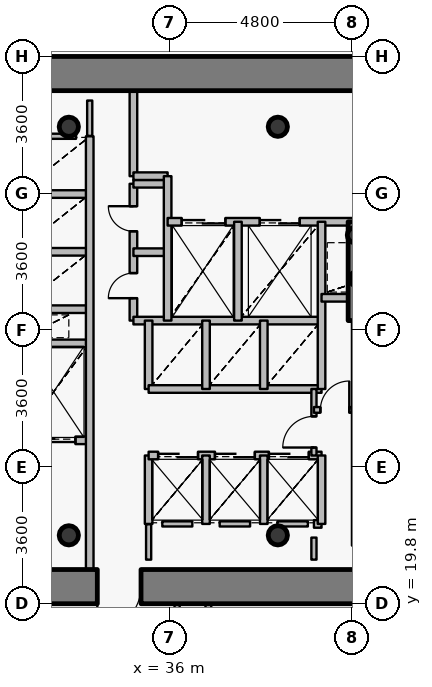
"""IFC4 building model, lengths in metres.
Left out: names, types, materials, properties, quantities, classifications, styles, units other than length and angle.
Written with IfcOpenShell. Run it as: python <this file> out.ifc"""

import sys

from ifc_helpers import new_model, si_unit, direction, frame, frame_2d, origin, origin_2d, place, context, subcontext, project, spatial, rectangle, hollow_circle, extrude, source, transform, mapped, element, fill, save


model = new_model("IFC4")
c1 = context("Model", 3, precision=1e-05, world=origin(), true_north=direction((0.0, 1.0)))
c2 = subcontext(c1, "Body", "Model", "MODEL_VIEW")
j1 = project(units=[si_unit("LENGTHUNIT", "METRE"), si_unit("PLANEANGLEUNIT", "RADIAN")], contexts=[c1])
p1 = place(None, origin())
s1 = spatial("IfcSite", under=j1, at=p1, CompositionType="ELEMENT")
p2 = place(p1, origin())
s2 = spatial("IfcBuilding", under=s1, at=p2, CompositionType="ELEMENT")
p3 = place(p2, frame((0.0, 0.0, 45.0)))
s3 = spatial("IfcBuildingStorey", under=s2, at=p3, CompositionType="ELEMENT", Elevation=45.0)
for number, where, z_axis, x_axis in (
    (1, (33.35, 21.6, 0.0), (0.0, 0.0, 1.0), (1.0, 0.0, 0.0)),
    (2, (38.85, 21.6, 0.0), (0.0, 0.0, 1.0), (1.0, 0.0, 0.0)),
    (3, (38.85, 32.35, 0.0), (0.0, 0.0, 1.0), (1.0, 0.0, 0.0)),
    (4, (33.35, 32.35, 0.0), (0.0, 0.0, 1.0), (1.0, 0.0, 0.0)),
):
    element("IfcColumn", number, at=place(p3, frame(where, z_axis=z_axis, x_axis=x_axis)), inside=s3, PredefinedType="COLUMN", context=c2, shape_type="SweptSolid", body=[
        extrude(hollow_circle(Radius=0.254, WallThickness=0.02, at=origin_2d()), origin(), (0.0, 0.0, 1.0), 4.2),
    ])
for number, where, z_axis, x_axis in (
    (5, (40.95, 28.35, 0.0), (0.0, 0.0, 1.0), (1.0, 0.0, 0.0)),
    (6, (40.88, 29.5, 0.0), (0.0, 0.0, 1.0), (1.0, 0.0, 0.0)),
):
    element("IfcColumn", number, at=place(p3, frame(where, z_axis=z_axis, x_axis=x_axis)), inside=s3, PredefinedType="COLUMN", context=c2, shape_type="SweptSolid", body=[
        extrude(hollow_circle(Radius=0.203, WallThickness=0.016, at=origin_2d()), origin(), (0.0, 0.0, 1.0), 4.2),
    ])
p4 = place(p3, frame((26.75, 33.75, 0.0), z_axis=(0.0, 0.0, 1.0), x_axis=(1.0, 0.0, 0.0)))
e7 = element("IfcWall", 7, at=p4, inside=s3, PredefinedType="SHEAR", context=c2, shape_type="SweptSolid", body=[
    extrude(rectangle(XDim=18.5, YDim=0.9, at=frame_2d((9.25, 0.0))), origin(), (0.0, 0.0, 1.0), 3.4),
])
p5 = place(p3, frame((45.25, 20.25, 0.0), z_axis=(0.0, 0.0, 1.0), x_axis=(-1.0, 0.0, 0.0)))
e8 = element("IfcWall", 8, at=p5, inside=s3, PredefinedType="SHEAR", context=c2, shape_type="SweptSolid", body=[
    extrude(rectangle(XDim=18.5, YDim=0.9, at=frame_2d((9.25, 0.0))), origin(), (0.0, 0.0, 1.0), 3.4),
])
p6 = place(p5, frame((10.0, 0.0, 0.0)))
e9 = element("IfcOpeningElement", 9, at=p6, cuts=e8, PredefinedType="OPENING", context=c2, shape_type="SweptSolid", body=[
    extrude(rectangle(XDim=1.15, YDim=2.15, at=origin_2d()), frame((0.575, 0.46, 1.075), z_axis=(0.0, -1.0, 0.0), x_axis=(1.0, 0.0, 0.0)), (0.0, 0.0, 1.0), 0.92),
])
p7 = place(p3, frame((40.9, 27.25, 0.0), z_axis=(0.0, 0.0, 1.0), x_axis=(0.0, 1.0, 0.0)))
e10 = element("IfcWall", 10, at=p7, inside=s3, PredefinedType="SHEAR", context=c2, shape_type="SweptSolid", body=[
    extrude(rectangle(XDim=2.6, YDim=0.4, at=frame_2d((1.3, 0.0))), origin(), (0.0, 0.0, 1.0), 3.55),
])
p8 = place(p3, frame((32.0, 24.1, 0.0), z_axis=(0.0, 0.0, 1.0), x_axis=(1.0, 0.0, 0.0)))
e11 = element("IfcWall", 11, at=p8, inside=s3, PredefinedType="PARTITIONING", context=c2, shape_type="SweptSolid", body=[
    extrude(rectangle(XDim=1.9, YDim=0.2, at=frame_2d((0.95, 0.0))), origin(), (0.0, 0.0, 1.0), 3.535),
])
p9 = place(p8, frame((0.375, 0.0, 0.0)))
e12 = element("IfcOpeningElement", 12, at=p9, cuts=e11, PredefinedType="OPENING", context=c2, shape_type="SweptSolid", body=[
    extrude(rectangle(XDim=1.15, YDim=2.15, at=origin_2d()), frame((0.575, 0.11, 1.075), z_axis=(0.0, -1.0, 0.0), x_axis=(1.0, 0.0, 0.0)), (0.0, 0.0, 1.0), 0.22),
])
for number, where, z_axis, x_axis in (
    (13, (32.0, 26.65, 0.0), (0.0, 0.0, 1.0), (1.0, 0.0, 0.0)),
    (14, (32.0, 27.55, 0.0), (0.0, 0.0, 1.0), (1.0, 0.0, 0.0)),
    (15, (32.0, 29.06, 0.0), (0.0, 0.0, 1.0), (1.0, 0.0, 0.0)),
    (16, (32.0, 30.58, 0.0), (0.0, 0.0, 1.0), (1.0, 0.0, 0.0)),
):
    element("IfcWall", number, at=place(p3, frame(where, z_axis=z_axis, x_axis=x_axis)), inside=s3, PredefinedType="PARTITIONING", context=c2, shape_type="SweptSolid", body=[
        extrude(rectangle(XDim=1.9, YDim=0.2, at=frame_2d((0.95, 0.0))), origin(), (0.0, 0.0, 1.0), 3.535),
    ])
p10 = place(p3, frame((33.9, 20.7, 0.0), z_axis=(0.0, 0.0, 1.0), x_axis=(0.0, 1.0, 0.0)))
e17 = element("IfcWall", 17, at=p10, inside=s3, PredefinedType="PARTITIONING", context=c2, shape_type="SweptSolid", body=[
    extrude(rectangle(XDim=11.4, YDim=0.2, at=frame_2d((5.7, 0.0))), origin(), (0.0, 0.0, 1.0), 3.535),
])
p11 = place(p3, frame((35.05, 27.25, 0.0), z_axis=(0.0, 0.0, 1.0), x_axis=(0.0, 1.0, 0.0)))
e18 = element("IfcWall", 18, at=p11, inside=s3, PredefinedType="PARTITIONING", context=c2, shape_type="SweptSolid", body=[
    extrude(rectangle(XDim=3.6, YDim=0.2, at=frame_2d((1.8, 0.0))), origin(), (0.0, 0.0, 1.0), 3.95),
])
p12 = place(p11, frame((0.59, 0.0, 0.0)))
e19 = element("IfcOpeningElement", 19, at=p12, cuts=e18, PredefinedType="OPENING", context=c2, shape_type="SweptSolid", body=[
    extrude(rectangle(XDim=0.66, YDim=2.05, at=origin_2d()), frame((0.33, 0.11, 1.025), z_axis=(0.0, -1.0, 0.0), x_axis=(1.0, 0.0, 0.0)), (0.0, 0.0, 1.0), 0.22),
])
p13 = place(p11, frame((2.35, 0.0, 0.0)))
e20 = element("IfcOpeningElement", 20, at=p13, cuts=e18, PredefinedType="OPENING", context=c2, shape_type="SweptSolid", body=[
    extrude(rectangle(XDim=0.66, YDim=2.05, at=origin_2d()), frame((0.33, 0.11, 1.025), z_axis=(0.0, -1.0, 0.0), x_axis=(1.0, 0.0, 0.0)), (0.0, 0.0, 1.0), 0.22),
])
p14 = place(p3, frame((35.05, 27.25, 0.0), z_axis=(0.0, 0.0, 1.0), x_axis=(1.0, 0.0, 0.0)))
e21 = element("IfcWall", 21, at=p14, inside=s3, PredefinedType="PARTITIONING", context=c2, shape_type="SweptSolid", body=[
    extrude(rectangle(XDim=4.95, YDim=0.2, at=frame_2d((2.475, 0.0))), origin(), (0.0, 0.0, 1.0), 3.535),
])
for number, where, z_axis, x_axis in (
    (22, (35.05, 29.05, 0.0), (0.0, 0.0, 1.0), (1.0, 0.0, 0.0)),
    (23, (35.05, 30.85, 0.0), (0.0, 0.0, 1.0), (1.0, 0.0, 0.0)),
):
    element("IfcWall", number, at=place(p3, frame(where, z_axis=z_axis, x_axis=x_axis)), inside=s3, PredefinedType="PARTITIONING", context=c2, shape_type="SweptSolid", body=[
        extrude(rectangle(XDim=0.9, YDim=0.2, at=frame_2d((0.45, 0.0))), origin(), (0.0, 0.0, 1.0), 3.95),
    ])
p15 = place(p3, frame((35.05, 31.05, 0.0), z_axis=(0.0, 0.0, 1.0), x_axis=(0.0, 1.0, 0.0)))
e24 = element("IfcWall", 24, at=p15, inside=s3, PredefinedType="PARTITIONING", context=c2, shape_type="SweptSolid", body=[
    extrude(rectangle(XDim=2.25, YDim=0.2, at=frame_2d((1.125, 0.0))), origin(), (0.0, 0.0, 1.0), 3.535),
])
p16 = place(p3, frame((35.05, 31.05, 0.0), z_axis=(0.0, 0.0, 1.0), x_axis=(1.0, 0.0, 0.0)))
e25 = element("IfcWall", 25, at=p16, inside=s3, PredefinedType="PARTITIONING", context=c2, shape_type="SweptSolid", body=[
    extrude(rectangle(XDim=0.9, YDim=0.2, at=frame_2d((0.45, 0.0))), origin(), (0.0, 0.0, 1.0), 3.95),
])
p17 = place(p3, frame((35.45, 21.9, 0.0), z_axis=(0.0, 0.0, 1.0), x_axis=(0.0, 1.0, 0.0)))
e26 = element("IfcWall", 26, at=p17, inside=s3, PredefinedType="PARTITIONING", context=c2, shape_type="SweptSolid", body=[
    extrude(rectangle(XDim=1.8, YDim=0.2, at=frame_2d((0.9, 0.0))), origin(), (0.0, 0.0, 1.0), 3.95),
])
p18 = place(p3, frame((35.45, 23.7, 0.0), z_axis=(0.0, 0.0, 1.0), x_axis=(1.0, 0.0, 0.0)))
e27 = element("IfcWall", 27, at=p18, inside=s3, PredefinedType="PARTITIONING", context=c2, shape_type="SweptSolid", body=[
    extrude(rectangle(XDim=4.55, YDim=0.2, at=frame_2d((2.275, 0.0))), origin(), (0.0, 0.0, 1.0), 3.535),
])
p19 = place(p18, frame((0.25, 0.0, 0.0)))
e28 = element("IfcOpeningElement", 28, at=p19, cuts=e27, PredefinedType="OPENING", context=c2, shape_type="SweptSolid", body=[
    extrude(rectangle(XDim=1.05, YDim=2.15, at=origin_2d()), frame((0.525, 0.11, 1.075), z_axis=(0.0, -1.0, 0.0), x_axis=(1.0, 0.0, 0.0)), (0.0, 0.0, 1.0), 0.22),
])
p20 = place(p18, frame((1.745, 0.0, 0.0)))
e29 = element("IfcOpeningElement", 29, at=p20, cuts=e27, PredefinedType="OPENING", context=c2, shape_type="SweptSolid", body=[
    extrude(rectangle(XDim=1.05, YDim=2.15, at=origin_2d()), frame((0.525, 0.11, 1.075), z_axis=(0.0, -1.0, 0.0), x_axis=(1.0, 0.0, 0.0)), (0.0, 0.0, 1.0), 0.22),
])
p21 = place(p18, frame((3.165, 0.0, 0.0)))
e30 = element("IfcOpeningElement", 30, at=p21, cuts=e27, PredefinedType="OPENING", context=c2, shape_type="SweptSolid", body=[
    extrude(rectangle(XDim=1.05, YDim=2.15, at=origin_2d()), frame((0.525, 0.11, 1.075), z_axis=(0.0, -1.0, 0.0), x_axis=(1.0, 0.0, 0.0)), (0.0, 0.0, 1.0), 0.22),
])
p22 = place(p3, frame((35.45, 25.45, 0.0), z_axis=(0.0, 0.0, 1.0), x_axis=(0.0, 1.0, 0.0)))
e31 = element("IfcWall", 31, at=p22, inside=s3, PredefinedType="PARTITIONING", context=c2, shape_type="SweptSolid", body=[
    extrude(rectangle(XDim=1.8, YDim=0.2, at=frame_2d((0.9, 0.0))), origin(), (0.0, 0.0, 1.0), 3.95),
])
p23 = place(p3, frame((35.45, 25.45, 0.0), z_axis=(0.0, 0.0, 1.0), x_axis=(1.0, 0.0, 0.0)))
e32 = element("IfcWall", 32, at=p23, inside=s3, PredefinedType="PARTITIONING", context=c2, shape_type="SweptSolid", body=[
    extrude(rectangle(XDim=4.55, YDim=0.2, at=frame_2d((2.275, 0.0))), origin(), (0.0, 0.0, 1.0), 3.535),
])
p24 = place(p3, frame((35.95, 27.25, 0.0), z_axis=(0.0, 0.0, 1.0), x_axis=(0.0, 1.0, 0.0)))
e33 = element("IfcWall", 33, at=p24, inside=s3, PredefinedType="PARTITIONING", context=c2, shape_type="SweptSolid", body=[
    extrude(rectangle(XDim=3.8, YDim=0.2, at=frame_2d((1.9, 0.0))), origin(), (0.0, 0.0, 1.0), 3.95),
])
p25 = place(p3, frame((35.95, 29.85, 0.0), z_axis=(0.0, 0.0, 1.0), x_axis=(1.0, 0.0, 0.0)))
e34 = element("IfcWall", 34, at=p25, inside=s3, PredefinedType="PARTITIONING", context=c2, shape_type="SweptSolid", body=[
    extrude(rectangle(XDim=8.49, YDim=0.2, at=frame_2d((4.245, 0.0))), origin(), (0.0, 0.0, 1.0), 3.535),
])
p26 = place(p25, frame((6.1, 0.0, 0.0)))
e35 = element("IfcOpeningElement", 35, at=p26, cuts=e34, PredefinedType="OPENING", context=c2, shape_type="SweptSolid", body=[
    extrude(rectangle(XDim=1.2, YDim=2.15, at=origin_2d()), frame((0.6, 0.11, 1.075), z_axis=(0.0, -1.0, 0.0), x_axis=(1.0, 0.0, 0.0)), (0.0, 0.0, 1.0), 0.22),
])
p27 = place(p25, frame((0.37, 0.0, 0.0)))
e36 = element("IfcOpeningElement", 36, at=p27, cuts=e34, PredefinedType="OPENING", context=c2, shape_type="SweptSolid", body=[
    extrude(rectangle(XDim=1.15, YDim=2.15, at=origin_2d()), frame((0.575, 0.11, 1.075), z_axis=(0.0, -1.0, 0.0), x_axis=(1.0, 0.0, 0.0)), (0.0, 0.0, 1.0), 0.22),
])
p28 = place(p25, frame((2.425, 0.0, 0.0)))
e37 = element("IfcOpeningElement", 37, at=p28, cuts=e34, PredefinedType="OPENING", context=c2, shape_type="SweptSolid", body=[
    extrude(rectangle(XDim=1.05, YDim=2.15, at=origin_2d()), frame((0.525, 0.11, 1.075), z_axis=(0.0, -1.0, 0.0), x_axis=(1.0, 0.0, 0.0)), (0.0, 0.0, 1.0), 0.22),
])
p29 = place(p3, frame((36.2, 17.9, 0.0), z_axis=(0.0, 0.0, 1.0), x_axis=(0.0, 1.0, 0.0)))
e38 = element("IfcWall", 38, at=p29, inside=s3, PredefinedType="PARTITIONING", context=c2, shape_type="SweptSolid", body=[
    extrude(rectangle(XDim=1.9, YDim=0.135, at=frame_2d((0.95, 0.0))), origin(), (0.0, 0.0, 1.0), 3.285),
])
for number, where, z_axis, x_axis in (
    (39, (36.96, 21.9, 0.0), (0.0, 0.0, 1.0), (0.0, 1.0, 0.0)),
    (40, (36.96, 25.45, 0.0), (0.0, 0.0, 1.0), (0.0, 1.0, 0.0)),
):
    element("IfcWall", number, at=place(p3, frame(where, z_axis=z_axis, x_axis=x_axis)), inside=s3, PredefinedType="PARTITIONING", context=c2, shape_type="SweptSolid", body=[
        extrude(rectangle(XDim=1.8, YDim=0.2, at=frame_2d((0.9, 0.0))), origin(), (0.0, 0.0, 1.0), 3.95),
    ])
p30 = place(p3, frame((37.012, 19.8, 0.0), z_axis=(0.0, 0.0, 1.0), x_axis=(0.139168038406, -0.990268780224, 0.0)))
e41 = element("IfcWall", 41, at=p30, inside=s3, PredefinedType="PARTITIONING", context=c2, shape_type="SweptSolid", body=[
    extrude(rectangle(XDim=17.067, YDim=0.15, at=frame_2d((8.534, 0.0))), origin(), (0.0, 0.0, 1.0), 3.335),
])
p31 = place(p3, frame((37.8, 27.25, 0.0), z_axis=(0.0, 0.0, 1.0), x_axis=(0.0, 1.0, 0.0)))
e42 = element("IfcWall", 42, at=p31, inside=s3, PredefinedType="PARTITIONING", context=c2, shape_type="SweptSolid", body=[
    extrude(rectangle(XDim=2.6, YDim=0.2, at=frame_2d((1.3, 0.0))), origin(), (0.0, 0.0, 1.0), 3.95),
])
for number, where, z_axis, x_axis in (
    (43, (38.48, 21.9, 0.0), (0.0, 0.0, 1.0), (0.0, 1.0, 0.0)),
    (44, (38.48, 25.45, 0.0), (0.0, 0.0, 1.0), (0.0, 1.0, 0.0)),
):
    element("IfcWall", number, at=place(p3, frame(where, z_axis=z_axis, x_axis=x_axis)), inside=s3, PredefinedType="PARTITIONING", context=c2, shape_type="SweptSolid", body=[
        extrude(rectangle(XDim=1.8, YDim=0.2, at=frame_2d((0.9, 0.0))), origin(), (0.0, 0.0, 1.0), 3.95),
    ])
p32 = place(p3, frame((39.8, 21.9, 0.0), z_axis=(0.0, 0.0, 1.0), x_axis=(1.0, 0.0, 0.0)))
e45 = element("IfcWall", 45, at=p32, inside=s3, PredefinedType="PARTITIONING", context=c2, shape_type="SweptSolid", body=[
    extrude(rectangle(XDim=0.2, YDim=0.2, at=frame_2d((0.1, 0.0))), origin(), (0.0, 0.0, 1.0), 3.95),
])
p33 = place(p3, frame((39.8, 23.7, 0.0), z_axis=(0.0, 0.0, 1.0), x_axis=(0.0, 1.0, 0.0)))
e46 = element("IfcWall", 46, at=p33, inside=s3, PredefinedType="PARTITIONING", context=c2, shape_type="SweptSolid", body=[
    extrude(rectangle(XDim=1.75, YDim=0.135, at=frame_2d((0.875, 0.0))), origin(), (0.0, 0.0, 1.0), 3.95),
])
p34 = place(p33, frame((0.21, 0.0, 0.0)))
e47 = element("IfcOpeningElement", 47, at=p34, cuts=e46, PredefinedType="OPENING", context=c2, shape_type="SweptSolid", body=[
    extrude(rectangle(XDim=0.82, YDim=2.1, at=origin_2d()), frame((0.41, 0.078, 1.05), z_axis=(0.0, -1.0, 0.0), x_axis=(1.0, 0.0, 0.0)), (0.0, 0.0, 1.0), 0.155),
])
p35 = place(p3, frame((39.8, 24.9, 0.0), z_axis=(0.0, 0.0, 1.0), x_axis=(1.0, 0.0, 0.0)))
e48 = element("IfcWall", 48, at=p35, inside=s3, PredefinedType="PARTITIONING", context=c2, shape_type="SweptSolid", body=[
    extrude(rectangle(XDim=1.1, YDim=0.15, at=frame_2d((0.55, 0.0))), origin(), (0.0, 0.0, 1.0), 3.95),
])
p36 = place(p35, frame((0.17, 0.0, 0.0)))
e49 = element("IfcOpeningElement", 49, at=p36, cuts=e48, PredefinedType="OPENING", context=c2, shape_type="SweptSolid", body=[
    extrude(rectangle(XDim=0.76, YDim=2.1, at=origin_2d()), frame((0.38, 0.085, 1.05), z_axis=(0.0, -1.0, 0.0), x_axis=(1.0, 0.0, 0.0)), (0.0, 0.0, 1.0), 0.17),
])
p37 = place(p3, frame((40.0, 21.9, 0.0), z_axis=(0.0, 0.0, 1.0), x_axis=(0.0, 1.0, 0.0)))
e50 = element("IfcWall", 50, at=p37, inside=s3, PredefinedType="PARTITIONING", context=c2, shape_type="SweptSolid", body=[
    extrude(rectangle(XDim=1.8, YDim=0.2, at=frame_2d((0.9, 0.0))), origin(), (0.0, 0.0, 1.0), 3.95),
])
p38 = place(p3, frame((40.0, 25.45, 0.0), z_axis=(0.0, 0.0, 1.0), x_axis=(0.0, 1.0, 0.0)))
e51 = element("IfcWall", 51, at=p38, inside=s3, PredefinedType="PARTITIONING", context=c2, shape_type="SweptSolid", body=[
    extrude(rectangle(XDim=4.4, YDim=0.2, at=frame_2d((2.2, 0.0))), origin(), (0.0, 0.0, 1.0), 3.95),
])
p39 = place(p3, frame((40.0, 27.85, 0.0), z_axis=(0.0, 0.0, 1.0), x_axis=(1.0, 0.0, 0.0)))
e52 = element("IfcWall", 52, at=p39, inside=s3, PredefinedType="PARTITIONING", context=c2, shape_type="SweptSolid", body=[
    extrude(rectangle(XDim=0.9, YDim=0.2, at=frame_2d((0.45, 0.0))), origin(), (0.0, 0.0, 1.0), 3.95),
])
p40 = place(p3, frame((40.9, 21.33, 0.0), z_axis=(0.0, 0.0, 1.0), x_axis=(0.0, 1.0, 0.0)))
e53 = element("IfcWall", 53, at=p40, inside=s3, PredefinedType="PARTITIONING", context=c2, shape_type="SweptSolid", body=[
    extrude(rectangle(XDim=5.91, YDim=0.2, at=frame_2d((2.955, 0.0))), origin(), (0.0, 0.0, 1.0), 3.485),
])
p41 = place(p3, frame((36.6, 21.9, 0.0), z_axis=(0.0, 0.0, 1.0), x_axis=(-1.0, 0.0, 0.0)))
e54 = element("IfcWall", 54, at=p41, inside=s3, PredefinedType="PARTITIONING", context=c2, shape_type="SweptSolid", body=[
    extrude(rectangle(XDim=0.79, YDim=0.135, at=frame_2d((0.395, 0.0))), origin(), (0.0, 0.0, 1.0), 3.95),
])
p42 = place(p3, frame((38.12, 21.9, 0.0), z_axis=(0.0, 0.0, 1.0), x_axis=(-1.0, 0.0, 0.0)))
e55 = element("IfcWall", 55, at=p42, inside=s3, PredefinedType="PARTITIONING", context=c2, shape_type="SweptSolid", body=[
    extrude(rectangle(XDim=0.8, YDim=0.135, at=frame_2d((0.4, 0.0))), origin(), (0.0, 0.0, 1.0), 3.95),
])
p43 = place(p3, frame((39.64, 21.9, 0.0), z_axis=(0.0, 0.0, 1.0), x_axis=(-1.0, 0.0, 0.0)))
e56 = element("IfcWall", 56, at=p43, inside=s3, PredefinedType="PARTITIONING", context=c2, shape_type="SweptSolid", body=[
    extrude(rectangle(XDim=0.8, YDim=0.135, at=frame_2d((0.4, 0.0))), origin(), (0.0, 0.0, 1.0), 3.535),
])
p44 = place(p3, frame((32.36, 32.1, 0.0), z_axis=(0.0, 0.0, 1.0), x_axis=(1.0, 0.0, 0.0)))
e57 = element("IfcWall", 57, at=p44, inside=s3, PredefinedType="PARTITIONING", context=c2, shape_type="SweptSolid", body=[
    extrude(rectangle(XDim=1.18, YDim=0.135, at=frame_2d((0.59, 0.0))), origin(), (0.0, 0.0, 1.0), 3.535),
])
p45 = place(p3, frame((39.8, 20.96, 0.0), z_axis=(0.0, 0.0, 1.0), x_axis=(0.0, 1.0, 0.0)))
e58 = element("IfcWall", 58, at=p45, inside=s3, PredefinedType="PARTITIONING", context=c2, shape_type="SweptSolid", body=[
    extrude(rectangle(XDim=0.58, YDim=0.135, at=frame_2d((0.29, 0.0))), origin(), (0.0, 0.0, 1.0), 3.485),
])
for number, where, z_axis, x_axis in (
    (59, (35.45, 21.89, 0.0), (0.0, 0.0, 1.0), (0.0, -1.0, 0.0)),
    (60, (33.9, 32.11, 0.0), (0.0, 0.0, 1.0), (0.0, 1.0, 0.0)),
):
    element("IfcWall", number, at=place(p3, frame(where, z_axis=z_axis, x_axis=x_axis)), inside=s3, PredefinedType="PARTITIONING", context=c2, shape_type="SweptSolid", body=[
        extrude(rectangle(XDim=0.93, YDim=0.135, at=frame_2d((0.465, 0.0))), origin(), (0.0, 0.0, 1.0), 3.535),
    ])
m1 = source(origin(), c2, "Body", "SweptSolid", [
    extrude(rectangle(XDim=1.15, YDim=2.15, at=origin_2d()), frame((0.575, 0.025, 1.075), z_axis=(0.0, -1.0, 0.0), x_axis=(1.0, 0.0, 0.0)), (0.0, 0.0, 1.0), 0.05),
])
p46 = place(p6, origin())
e61 = element("IfcDoor", 61, at=p46, inside=s3, OperationType="SINGLE_SWING_RIGHT", PredefinedType="DOOR", context=c2, shape_type="MappedRepresentation", body=[
    mapped(m1, transform((0.0, 0.0, 0.0), x_axis=(1.0, 0.0, 0.0), y_axis=(0.0, 1.0, 0.0), z_axis=(0.0, 0.0, 1.0), scale=1.0)),
])
fill(e9, e61)
m2 = source(origin(), c2, "Body", "SweptSolid", [
    extrude(rectangle(XDim=1.15, YDim=2.15, at=origin_2d()), frame((0.575, 0.025, 1.075), z_axis=(0.0, -1.0, 0.0), x_axis=(1.0, 0.0, 0.0)), (0.0, 0.0, 1.0), 0.05),
])
p47 = place(p27, origin())
e62 = element("IfcDoor", 62, at=p47, inside=s3, OperationType="DOUBLE_DOOR_SLIDING", PredefinedType="USERDEFINED", context=c2, shape_type="MappedRepresentation", body=[
    mapped(m2, transform((0.0, 0.0, 0.0), x_axis=(1.0, 0.0, 0.0), y_axis=(0.0, 1.0, 0.0), z_axis=(0.0, 0.0, 1.0), scale=1.0)),
])
fill(e36, e62)
p48 = place(p9, origin())
e63 = element("IfcDoor", 63, at=p48, inside=s3, OperationType="DOUBLE_DOOR_SLIDING", PredefinedType="USERDEFINED", context=c2, shape_type="MappedRepresentation", body=[
    mapped(m2, transform((0.0, 0.0, 0.0), x_axis=(1.0, 0.0, 0.0), y_axis=(0.0, 1.0, 0.0), z_axis=(0.0, 0.0, 1.0), scale=1.0)),
])
fill(e12, e63)
m3 = source(origin(), c2, "Body", "SweptSolid", [
    extrude(rectangle(XDim=1.05, YDim=2.15, at=origin_2d()), frame((0.525, 0.025, 1.075), z_axis=(0.0, -1.0, 0.0), x_axis=(1.0, 0.0, 0.0)), (0.0, 0.0, 1.0), 0.05),
])
p49 = place(p28, origin())
e64 = element("IfcDoor", 64, at=p49, inside=s3, OperationType="DOUBLE_DOOR_SLIDING", PredefinedType="USERDEFINED", context=c2, shape_type="MappedRepresentation", body=[
    mapped(m3, transform((0.0, 0.0, 0.0), x_axis=(1.0, 0.0, 0.0), y_axis=(0.0, 1.0, 0.0), z_axis=(0.0, 0.0, 1.0), scale=1.0)),
])
fill(e37, e64)
p50 = place(p19, origin())
e65 = element("IfcDoor", 65, at=p50, inside=s3, OperationType="DOUBLE_DOOR_SLIDING", PredefinedType="USERDEFINED", context=c2, shape_type="MappedRepresentation", body=[
    mapped(m3, transform((0.0, 0.0, 0.0), x_axis=(1.0, 0.0, 0.0), y_axis=(0.0, 1.0, 0.0), z_axis=(0.0, 0.0, 1.0), scale=1.0)),
])
fill(e28, e65)
p51 = place(p20, origin())
e66 = element("IfcDoor", 66, at=p51, inside=s3, OperationType="DOUBLE_DOOR_SLIDING", PredefinedType="USERDEFINED", context=c2, shape_type="MappedRepresentation", body=[
    mapped(m3, transform((0.0, 0.0, 0.0), x_axis=(1.0, 0.0, 0.0), y_axis=(0.0, 1.0, 0.0), z_axis=(0.0, 0.0, 1.0), scale=1.0)),
])
fill(e29, e66)
p52 = place(p21, origin())
e67 = element("IfcDoor", 67, at=p52, inside=s3, OperationType="DOUBLE_DOOR_SLIDING", PredefinedType="USERDEFINED", context=c2, shape_type="MappedRepresentation", body=[
    mapped(m3, transform((0.0, 0.0, 0.0), x_axis=(1.0, 0.0, 0.0), y_axis=(0.0, 1.0, 0.0), z_axis=(0.0, 0.0, 1.0), scale=1.0)),
])
fill(e30, e67)
m4 = source(origin(), c2, "Body", "SweptSolid", [
    extrude(rectangle(XDim=0.66, YDim=2.05, at=origin_2d()), frame((0.33, 0.025, 1.025), z_axis=(0.0, -1.0, 0.0), x_axis=(1.0, 0.0, 0.0)), (0.0, 0.0, 1.0), 0.05),
])
p53 = place(p12, origin())
e68 = element("IfcDoor", 68, at=p53, inside=s3, OperationType="SINGLE_SWING_LEFT", PredefinedType="USERDEFINED", context=c2, shape_type="MappedRepresentation", body=[
    mapped(m4, transform((0.0, 0.0, 0.0), x_axis=(1.0, 0.0, 0.0), y_axis=(0.0, 1.0, 0.0), z_axis=(0.0, 0.0, 1.0), scale=1.0)),
])
fill(e19, e68)
p54 = place(p13, origin())
e69 = element("IfcDoor", 69, at=p54, inside=s3, OperationType="SINGLE_SWING_RIGHT", PredefinedType="USERDEFINED", context=c2, shape_type="MappedRepresentation", body=[
    mapped(m4, transform((0.0, 0.0, 0.0), x_axis=(1.0, 0.0, 0.0), y_axis=(0.0, 1.0, 0.0), z_axis=(0.0, 0.0, 1.0), scale=1.0)),
])
fill(e20, e69)
m5 = source(origin(), c2, "Body", "SweptSolid", [
    extrude(rectangle(XDim=0.82, YDim=2.1, at=origin_2d()), frame((0.41, 0.025, 1.05), z_axis=(0.0, -1.0, 0.0), x_axis=(1.0, 0.0, 0.0)), (0.0, 0.0, 1.0), 0.05),
])
p55 = place(p34, origin())
e70 = element("IfcDoor", 70, at=p55, inside=s3, OperationType="SINGLE_SWING_LEFT", PredefinedType="DOOR", context=c2, shape_type="MappedRepresentation", body=[
    mapped(m5, transform((0.0, 0.0, 0.0), x_axis=(1.0, 0.0, 0.0), y_axis=(0.0, 1.0, 0.0), z_axis=(0.0, 0.0, 1.0), scale=1.0)),
])
fill(e47, e70)
m6 = source(origin(), c2, "Body", "SweptSolid", [
    extrude(rectangle(XDim=0.76, YDim=2.1, at=origin_2d()), frame((0.38, 0.025, 1.05), z_axis=(0.0, -1.0, 0.0), x_axis=(1.0, 0.0, 0.0)), (0.0, 0.0, 1.0), 0.05),
])
p56 = place(p36, origin())
e71 = element("IfcDoor", 71, at=p56, inside=s3, OperationType="SINGLE_SWING_RIGHT", PredefinedType="DOOR", context=c2, shape_type="MappedRepresentation", body=[
    mapped(m6, transform((0.0, 0.0, 0.0), x_axis=(1.0, 0.0, 0.0), y_axis=(0.0, 1.0, 0.0), z_axis=(0.0, 0.0, 1.0), scale=1.0)),
])
fill(e49, e71)
save(model, sys.argv[1])
